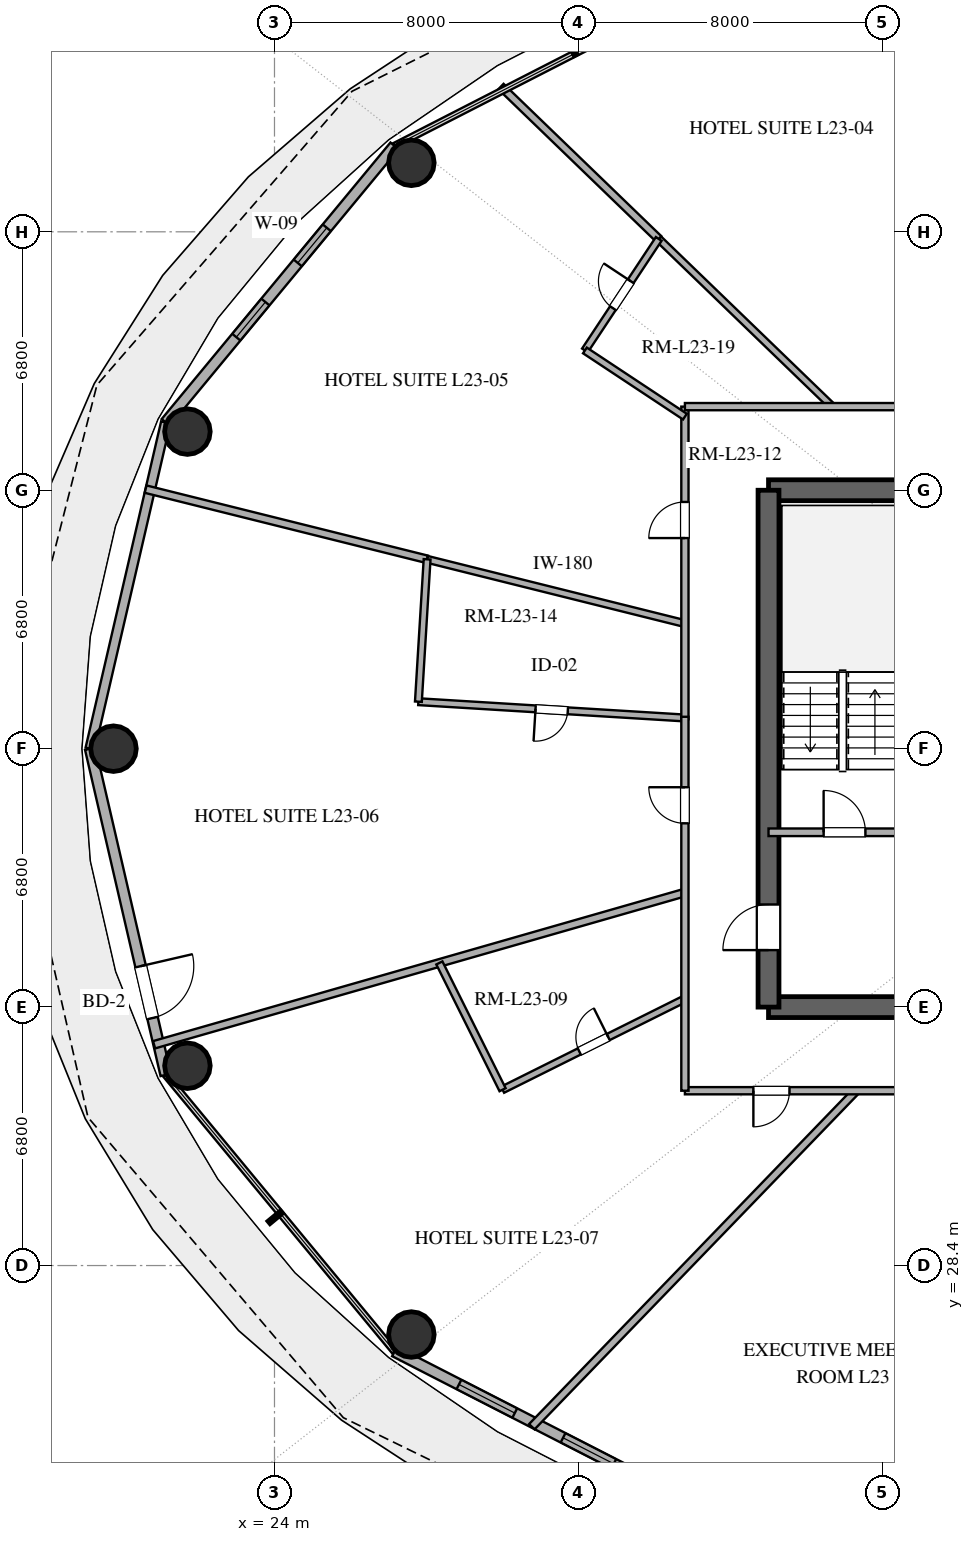
"""IFC4 building model, lengths in metres.
Left out: names, types, materials, properties, quantities, classifications, styles, units other than length and angle.
Written with IfcOpenShell. Run it as: python <this file> out.ifc"""

import sys

from ifc_helpers import new_model, si_unit, direction, frame, frame_2d, origin, origin_2d, place, context, subcontext, project, spatial, rectangle, hollow_circle, extrude, element, fill, save


model = new_model("IFC4")
c1 = context("Model", 3, precision=1e-05, world=origin(), true_north=direction((0.0, 1.0)))
c2 = subcontext(c1, "Body", "Model", "MODEL_VIEW")
j1 = project(units=[si_unit("LENGTHUNIT", "METRE"), si_unit("PLANEANGLEUNIT", "RADIAN")], contexts=[c1])
p1 = place(None, origin())
s1 = spatial("IfcSite", under=j1, at=p1, CompositionType="ELEMENT")
p2 = place(p1, origin())
s2 = spatial("IfcBuilding", under=s1, at=p2, CompositionType="ELEMENT")
p3 = place(p2, frame((0.0, 0.0, 94.8)))
s3 = spatial("IfcBuildingStorey", under=s2, at=p3, CompositionType="ELEMENT", Elevation=94.8)
for number, where, z_axis, x_axis in (
    (1, (37.0, 35.2, 0.0), (0.0, 0.0, 1.0), (1.0, 0.0, 0.0)),
    (2, (37.0, 48.8, 0.0), (0.0, 0.0, 1.0), (1.0, 0.0, 0.0)),
):
    element("IfcWall", number, at=place(p3, frame(where, z_axis=z_axis, x_axis=x_axis)), inside=s3, PredefinedType="SHEAR", context=c2, shape_type="SweptSolid", body=[
        extrude(rectangle(XDim=4.0, YDim=0.55, at=frame_2d((2.0, 0.0))), origin(), (0.0, 0.0, 1.0), 3.38),
    ])
p4 = place(p3, frame((37.0, 35.2, 0.0), z_axis=(0.0, 0.0, 1.0), x_axis=(0.0, 1.0, 0.0)))
e3 = element("IfcWall", 3, at=p4, inside=s3, PredefinedType="SHEAR", context=c2, shape_type="SweptSolid", body=[
    extrude(rectangle(XDim=13.6, YDim=0.55, at=frame_2d((6.8, 0.0))), origin(), (0.0, 0.0, 1.0), 3.38),
])
p5 = place(p4, frame((1.5, 0.0, 0.0)))
e4 = element("IfcOpeningElement", 4, at=p5, cuts=e3, PredefinedType="OPENING", context=c2, shape_type="SweptSolid", body=[
    extrude(rectangle(XDim=1.2, YDim=2.15, at=frame_2d((0.6, 1.075))), frame((0.0, 0.285, 0.0), z_axis=(0.0, -1.0, 0.0), x_axis=(1.0, 0.0, 0.0)), (0.0, 0.0, 1.0), 0.57),
])
for number, where, z_axis, x_axis in (
    (5, (27.602, 57.415, 0.0), (0.0, 0.0, 1.0), (1.0, 0.0, 0.0)),
    (6, (21.709, 50.343, 0.0), (0.0, 0.0, 1.0), (1.0, 0.0, 0.0)),
    (7, (19.763, 42.0, 0.0), (0.0, 0.0, 1.0), (1.0, 0.0, 0.0)),
    (8, (21.709, 33.657, 0.0), (0.0, 0.0, 1.0), (1.0, 0.0, 0.0)),
    (9, (27.602, 26.585, 0.0), (0.0, 0.0, 1.0), (1.0, 0.0, 0.0)),
):
    element("IfcColumn", number, at=place(p3, frame(where, z_axis=z_axis, x_axis=x_axis)), inside=s3, PredefinedType="COLUMN", context=c2, shape_type="SweptSolid", body=[
        extrude(hollow_circle(Radius=0.6, WallThickness=0.032, at=origin_2d()), origin(), (0.0, 0.0, 1.0), 3.38),
    ])
p6 = place(p3, frame((27.16, 57.86, 0.0), z_axis=(0.0, 0.0, 1.0), x_axis=(-0.637505817448, -0.770445541696, 0.0)))
e10 = element("IfcWall", 10, at=p6, inside=s3, PredefinedType="SOLIDWALL", context=c2, shape_type="SweptSolid", body=[
    extrude(rectangle(XDim=9.445, YDim=0.28, at=frame_2d((4.723, 0.0))), origin(), (0.0, 0.0, 1.0), 3.38),
])
p7 = place(p6, frame((2.797, 0.0, 0.85)))
e11 = element("IfcOpeningElement", 11, at=p7, cuts=e10, PredefinedType="OPENING", context=c2, shape_type="SweptSolid", body=[
    extrude(rectangle(XDim=1.2, YDim=1.8, at=frame_2d((0.6, 0.9))), frame((0.0, 0.15, 0.0), z_axis=(0.0, -1.0, 0.0), x_axis=(1.0, 0.0, 0.0)), (0.0, 0.0, 1.0), 0.3),
])
p8 = place(p6, frame((5.332, 0.0, 0.85)))
e12 = element("IfcOpeningElement", 12, at=p8, cuts=e10, PredefinedType="OPENING", context=c2, shape_type="SweptSolid", body=[
    extrude(rectangle(XDim=1.2, YDim=1.8, at=frame_2d((0.6, 0.9))), frame((0.0, 0.15, 0.0), z_axis=(0.0, -1.0, 0.0), x_axis=(1.0, 0.0, 0.0)), (0.0, 0.0, 1.0), 0.3),
])
p9 = place(p3, frame((21.139, 50.583, 0.0), z_axis=(0.0, 0.0, 1.0), x_axis=(-0.22558597182, -0.974223264616, 0.0)))
e13 = element("IfcWall", 13, at=p9, inside=s3, PredefinedType="SOLIDWALL", context=c2, shape_type="SweptSolid", body=[
    extrude(rectangle(XDim=8.811, YDim=0.25, at=frame_2d((4.405, 0.0))), origin(), (0.0, 0.0, 1.0), 3.38),
])
p10 = place(p3, frame((19.151, 42.0, 0.0), z_axis=(0.0, 0.0, 1.0), x_axis=(0.22558597182, -0.974223264616, 0.0)))
e14 = element("IfcWall", 14, at=p10, inside=s3, PredefinedType="SOLIDWALL", context=c2, shape_type="SweptSolid", body=[
    extrude(rectangle(XDim=8.811, YDim=0.28, at=frame_2d((4.405, 0.0))), origin(), (0.0, 0.0, 1.0), 3.38),
])
p11 = place(p10, frame((5.875, 0.0, 0.0)))
e15 = element("IfcOpeningElement", 15, at=p11, cuts=e14, PredefinedType="OPENING", context=c2, shape_type="SweptSolid", body=[
    extrude(rectangle(XDim=1.4, YDim=2.2, at=frame_2d((0.7, 1.1))), frame((0.0, 0.15, 0.0), z_axis=(0.0, -1.0, 0.0), x_axis=(1.0, 0.0, 0.0)), (0.0, 0.0, 1.0), 0.3),
])
p12 = place(p3, frame((27.16, 26.14, 0.0), z_axis=(0.0, 0.0, 1.0), x_axis=(0.889959505023, -0.45603955905, 0.0)))
e16 = element("IfcWall", 16, at=p12, inside=s3, PredefinedType="SOLIDWALL", context=c2, shape_type="SweptSolid", body=[
    extrude(rectangle(XDim=10.662, YDim=0.28, at=frame_2d((5.331, 0.0))), origin(), (0.0, 0.0, 1.0), 3.38),
])
p13 = place(p12, frame((1.904, 0.0, 0.85)))
e17 = element("IfcOpeningElement", 17, at=p13, cuts=e16, PredefinedType="OPENING", context=c2, shape_type="SweptSolid", body=[
    extrude(rectangle(XDim=1.65, YDim=2.0, at=frame_2d((0.825, 1.0))), frame((0.0, 0.15, 0.0), z_axis=(0.0, -1.0, 0.0), x_axis=(1.0, 0.0, 0.0)), (0.0, 0.0, 1.0), 0.3),
])
p14 = place(p12, frame((4.982, 0.0, 0.85)))
e18 = element("IfcOpeningElement", 18, at=p14, cuts=e16, PredefinedType="OPENING", context=c2, shape_type="SweptSolid", body=[
    extrude(rectangle(XDim=1.5, YDim=2.0, at=frame_2d((0.75, 1.0))), frame((0.0, 0.15, 0.0), z_axis=(0.0, -1.0, 0.0), x_axis=(1.0, 0.0, 0.0)), (0.0, 0.0, 1.0), 0.3),
])
p15 = place(p12, frame((7.096, 0.0, 0.85)))
e19 = element("IfcOpeningElement", 19, at=p15, cuts=e16, PredefinedType="OPENING", context=c2, shape_type="SweptSolid", body=[
    extrude(rectangle(XDim=1.5, YDim=2.0, at=frame_2d((0.75, 1.0))), frame((0.0, 0.15, 0.0), z_axis=(0.0, -1.0, 0.0), x_axis=(1.0, 0.0, 0.0)), (0.0, 0.0, 1.0), 0.3),
])
p16 = place(p3, frame((37.0, 39.8, 0.0), z_axis=(0.0, 0.0, 1.0), x_axis=(1.0, 0.0, 0.0)))
e20 = element("IfcWall", 20, at=p16, inside=s3, PredefinedType="SOLIDWALL", context=c2, shape_type="SweptSolid", body=[
    extrude(rectangle(XDim=4.0, YDim=0.2, at=frame_2d((2.0, 0.0))), origin(), (0.0, 0.0, 1.0), 2.74),
])
p17 = place(p16, frame((1.45, 0.0, 0.0)))
e21 = element("IfcOpeningElement", 21, at=p17, cuts=e20, PredefinedType="OPENING", context=c2, shape_type="SweptSolid", body=[
    extrude(rectangle(XDim=1.1, YDim=2.15, at=frame_2d((0.55, 1.075))), frame((0.0, 0.11, 0.0), z_axis=(0.0, -1.0, 0.0), x_axis=(1.0, 0.0, 0.0)), (0.0, 0.0, 1.0), 0.22),
])
p18 = place(p3, frame((30.772, 24.16, 0.0), z_axis=(0.0, 0.0, 1.0), x_axis=(0.694672506389, 0.719326149161, 0.0)))
e22 = element("IfcWall", 22, at=p18, inside=s3, PredefinedType="PARTITIONING", context=c2, shape_type="SweptSolid", body=[
    extrude(rectangle(XDim=12.289, YDim=0.2, at=frame_2d((6.145, 0.0))), origin(), (0.0, 0.0, 1.0), 2.74),
])
p19 = place(p3, frame((34.8, 38.215, 0.0), z_axis=(0.0, 0.0, 1.0), x_axis=(-0.961261030421, -0.275639676741, 0.0)))
e23 = element("IfcWall", 23, at=p19, inside=s3, PredefinedType="PARTITIONING", context=c2, shape_type="SweptSolid", body=[
    extrude(rectangle(XDim=14.531, YDim=0.2, at=frame_2d((7.266, 0.0))), origin(), (0.0, 0.0, 1.0), 2.74),
])
p20 = place(p3, frame((20.609, 48.829, 0.0), z_axis=(0.0, 0.0, 1.0), x_axis=(0.970302209845, -0.241895889938, 0.0)))
e24 = element("IfcWall", 24, at=p20, inside=s3, PredefinedType="PARTITIONING", context=c2, shape_type="SweptSolid", body=[
    extrude(rectangle(XDim=7.633, YDim=0.2, at=frame_2d((3.817, 0.0))), origin(), (0.0, 0.0, 1.0), 2.74),
])
p21 = place(p3, frame((34.8, 42.807, 0.0), z_axis=(0.0, 0.0, 1.0), x_axis=(-0.998134708281, 0.061050013314, 0.0)))
e25 = element("IfcWall", 25, at=p21, inside=s3, PredefinedType="PLUMBINGWALL", context=c2, shape_type="SweptSolid", body=[
    extrude(rectangle(XDim=7.026, YDim=0.18, at=frame_2d((3.513, 0.0))), origin(), (0.0, 0.0, 1.0), 2.74),
])
p22 = place(p21, frame((3.088, 0.0, 0.0)))
e26 = element("IfcOpeningElement", 26, at=p22, cuts=e25, PredefinedType="OPENING", context=c2, shape_type="SweptSolid", body=[
    extrude(rectangle(XDim=0.85, YDim=2.1, at=frame_2d((0.425, 1.05))), frame((0.0, 0.1, 0.0), z_axis=(0.0, -1.0, 0.0), x_axis=(1.0, 0.0, 0.0)), (0.0, 0.0, 1.0), 0.2),
])
p23 = place(p3, frame((28.016, 46.983, 0.0), z_axis=(0.0, 0.0, 1.0), x_axis=(0.970290206094, -0.241944034764, 0.0)))
e27 = element("IfcWall", 27, at=p23, inside=s3, PredefinedType="PLUMBINGWALL", context=c2, shape_type="SweptSolid", body=[
    extrude(rectangle(XDim=6.992, YDim=0.18, at=frame_2d((3.496, 0.0))), origin(), (0.0, 0.0, 1.0), 2.74),
])
p24 = place(p3, frame((47.482, 33.0, 0.0), z_axis=(0.0, 0.0, 1.0), x_axis=(-1.0, 0.0, 0.0)))
e28 = element("IfcWall", 28, at=p24, inside=s3, PredefinedType="PARTITIONING", context=c2, shape_type="SweptSolid", body=[
    extrude(rectangle(XDim=12.682, YDim=0.19, at=frame_2d((6.341, 0.0))), origin(), (0.0, 0.0, 1.0), 2.74),
])
p25 = place(p24, frame((4.455, 0.0, 0.0)))
e29 = element("IfcOpeningElement", 29, at=p25, cuts=e28, PredefinedType="OPENING", context=c2, shape_type="SweptSolid", body=[
    extrude(rectangle(XDim=1.0, YDim=2.2, at=frame_2d((0.5, 1.1))), frame((0.0, 0.105, 0.0), z_axis=(0.0, -1.0, 0.0), x_axis=(1.0, 0.0, 0.0)), (0.0, 0.0, 1.0), 0.21),
])
p26 = place(p24, frame((9.93, 0.0, 0.0)))
e30 = element("IfcOpeningElement", 30, at=p26, cuts=e28, PredefinedType="OPENING", context=c2, shape_type="SweptSolid", body=[
    extrude(rectangle(XDim=0.95, YDim=2.15, at=frame_2d((0.475, 1.075))), frame((0.0, 0.105, 0.0), z_axis=(0.0, -1.0, 0.0), x_axis=(1.0, 0.0, 0.0)), (0.0, 0.0, 1.0), 0.21),
])
p27 = place(p3, frame((34.111, 55.413, 0.0), z_axis=(0.0, 0.0, 1.0), x_axis=(0.719318009274, -0.694680935059, 0.0)))
e31 = element("IfcWall", 31, at=p27, inside=s3, PredefinedType="PLUMBINGWALL", context=c2, shape_type="SweptSolid", body=[
    extrude(rectangle(XDim=6.352, YDim=0.18, at=frame_2d((3.176, 0.0))), origin(), (0.0, 0.0, 1.0), 2.74),
])
p28 = place(p3, frame((29.959, 59.422, 0.0), z_axis=(0.0, 0.0, 1.0), x_axis=(0.719370121813, -0.694626970281, 0.0)))
e32 = element("IfcWall", 32, at=p28, inside=s3, PredefinedType="PARTITIONING", context=c2, shape_type="SweptSolid", body=[
    extrude(rectangle(XDim=5.772, YDim=0.2, at=frame_2d((2.886, 0.0))), origin(), (0.0, 0.0, 1.0), 2.74),
])
p29 = place(p3, frame((34.8, 42.775, 0.0), z_axis=(0.0, 0.0, 1.0), x_axis=(0.0, 1.0, 0.0)))
e33 = element("IfcWall", 33, at=p29, inside=s3, PredefinedType="PARTITIONING", context=c2, shape_type="SweptSolid", body=[
    extrude(rectangle(XDim=8.225, YDim=0.19, at=frame_2d((4.112, 0.0))), origin(), (0.0, 0.0, 1.0), 2.74),
])
p30 = place(p29, frame((4.767, 0.0, 0.0)))
e34 = element("IfcOpeningElement", 34, at=p30, cuts=e33, PredefinedType="OPENING", context=c2, shape_type="SweptSolid", body=[
    extrude(rectangle(XDim=0.95, YDim=2.15, at=frame_2d((0.475, 1.075))), frame((0.0, 0.105, 0.0), z_axis=(0.0, -1.0, 0.0), x_axis=(1.0, 0.0, 0.0)), (0.0, 0.0, 1.0), 0.21),
])
p31 = place(p3, frame((30.002, 33.027, 0.0), z_axis=(0.0, 0.0, 1.0), x_axis=(0.894936648514, 0.446193226244, 0.0)))
e35 = element("IfcWall", 35, at=p31, inside=s3, PredefinedType="PLUMBINGWALL", context=c2, shape_type="SweptSolid", body=[
    extrude(rectangle(XDim=5.361, YDim=0.18, at=frame_2d((2.681, 0.0))), origin(), (0.0, 0.0, 1.0), 2.74),
])
p32 = place(p31, frame((2.256, 0.0, 0.0)))
e36 = element("IfcOpeningElement", 36, at=p32, cuts=e35, PredefinedType="OPENING", context=c2, shape_type="SweptSolid", body=[
    extrude(rectangle(XDim=0.85, YDim=2.1, at=frame_2d((0.425, 1.05))), frame((0.0, 0.1, 0.0), z_axis=(0.0, -1.0, 0.0), x_axis=(1.0, 0.0, 0.0)), (0.0, 0.0, 1.0), 0.2),
])
p33 = place(p3, frame((34.8, 51.0, 0.0), z_axis=(0.0, 0.0, 1.0), x_axis=(1.0, 0.0, 0.0)))
e37 = element("IfcWall", 37, at=p33, inside=s3, PredefinedType="PARTITIONING", context=c2, shape_type="SweptSolid", body=[
    extrude(rectangle(XDim=10.653, YDim=0.19, at=frame_2d((5.326, 0.0))), origin(), (0.0, 0.0, 1.0), 2.74),
])
p34 = place(p33, frame((5.816, 0.0, 0.0)))
e38 = element("IfcOpeningElement", 38, at=p34, cuts=e37, PredefinedType="OPENING", context=c2, shape_type="SweptSolid", body=[
    extrude(rectangle(XDim=0.95, YDim=2.15, at=frame_2d((0.475, 1.075))), frame((0.0, 0.105, 0.0), z_axis=(0.0, -1.0, 0.0), x_axis=(1.0, 0.0, 0.0)), (0.0, 0.0, 1.0), 0.21),
])
p35 = place(p3, frame((34.8, 33.0, 0.0), z_axis=(0.0, 0.0, 1.0), x_axis=(0.0, 1.0, 0.0)))
e39 = element("IfcWall", 39, at=p35, inside=s3, PredefinedType="PARTITIONING", context=c2, shape_type="SweptSolid", body=[
    extrude(rectangle(XDim=9.839, YDim=0.19, at=frame_2d((4.92, 0.0))), origin(), (0.0, 0.0, 1.0), 2.74),
])
p36 = place(p35, frame((7.035, 0.0, 0.0)))
e40 = element("IfcOpeningElement", 40, at=p36, cuts=e39, PredefinedType="OPENING", context=c2, shape_type="SweptSolid", body=[
    extrude(rectangle(XDim=0.95, YDim=2.15, at=frame_2d((0.475, 1.075))), frame((0.0, 0.105, 0.0), z_axis=(0.0, -1.0, 0.0), x_axis=(1.0, 0.0, 0.0)), (0.0, 0.0, 1.0), 0.21),
])
p37 = place(p3, frame((27.787, 43.236, 0.0), z_axis=(0.0, 0.0, 1.0), x_axis=(0.061013519028, 0.998136939751, 0.0)))
e41 = element("IfcWall", 41, at=p37, inside=s3, PredefinedType="PLUMBINGWALL", context=c2, shape_type="SweptSolid", body=[
    extrude(rectangle(XDim=3.753, YDim=0.18, at=frame_2d((1.877, 0.0))), origin(), (0.0, 0.0, 1.0), 2.74),
])
p38 = place(p3, frame((28.339, 36.362, 0.0), z_axis=(0.0, 0.0, 1.0), x_axis=(0.446243949247, -0.894911357488, 0.0)))
e42 = element("IfcWall", 42, at=p38, inside=s3, PredefinedType="PLUMBINGWALL", context=c2, shape_type="SweptSolid", body=[
    extrude(rectangle(XDim=3.727, YDim=0.18, at=frame_2d((1.864, 0.0))), origin(), (0.0, 0.0, 1.0), 2.74),
])
p39 = place(p3, frame((32.169, 52.479, 0.0), z_axis=(0.0, 0.0, 1.0), x_axis=(0.551959146688, 0.833871153349, 0.0)))
e43 = element("IfcWall", 43, at=p39, inside=s3, PredefinedType="PLUMBINGWALL", context=c2, shape_type="SweptSolid", body=[
    extrude(rectangle(XDim=3.519, YDim=0.18, at=frame_2d((1.759, 0.0))), origin(), (0.0, 0.0, 1.0), 2.74),
])
p40 = place(p39, frame((1.334, 0.0, 0.0)))
e44 = element("IfcOpeningElement", 44, at=p40, cuts=e43, PredefinedType="OPENING", context=c2, shape_type="SweptSolid", body=[
    extrude(rectangle(XDim=0.85, YDim=2.1, at=frame_2d((0.425, 1.05))), frame((0.0, 0.1, 0.0), z_axis=(0.0, -1.0, 0.0), x_axis=(1.0, 0.0, 0.0)), (0.0, 0.0, 1.0), 0.2),
])
p41 = place(p3, frame((34.8, 50.737, 0.0), z_axis=(0.0, 0.0, 1.0), x_axis=(-0.833855219674, 0.5519832177, 0.0)))
e45 = element("IfcWall", 45, at=p41, inside=s3, PredefinedType="PLUMBINGWALL", context=c2, shape_type="SweptSolid", body=[
    extrude(rectangle(XDim=3.155, YDim=0.18, at=frame_2d((1.578, 0.0))), origin(), (0.0, 0.0, 1.0), 2.74),
])
p42 = place(p7, origin())
e46 = element("IfcWindow", 46, at=p42, inside=s3, PartitioningType="SINGLE_PANEL", PredefinedType="WINDOW", context=c2, shape_type="SweptSolid", body=[
    extrude(rectangle(XDim=1.2, YDim=1.8, at=frame_2d((0.6, 0.9))), frame((0.0, 0.03, 0.0), z_axis=(0.0, -1.0, 0.0), x_axis=(1.0, 0.0, 0.0)), (0.0, 0.0, 1.0), 0.06),
])
fill(e11, e46)
p43 = place(p8, origin())
e47 = element("IfcWindow", 47, at=p43, inside=s3, PartitioningType="SINGLE_PANEL", PredefinedType="WINDOW", context=c2, shape_type="SweptSolid", body=[
    extrude(rectangle(XDim=1.2, YDim=1.8, at=frame_2d((0.6, 0.9))), frame((0.0, 0.03, 0.0), z_axis=(0.0, -1.0, 0.0), x_axis=(1.0, 0.0, 0.0)), (0.0, 0.0, 1.0), 0.06),
])
fill(e12, e47)
p44 = place(p11, origin())
e48 = element("IfcDoor", 48, at=p44, inside=s3, OperationType="SINGLE_SWING_LEFT", PredefinedType="DOOR", context=c2, shape_type="SweptSolid", body=[
    extrude(rectangle(XDim=1.4, YDim=2.2, at=frame_2d((0.7, 1.1))), frame((0.0, 0.025, 0.0), z_axis=(0.0, -1.0, 0.0), x_axis=(1.0, 0.0, 0.0)), (0.0, 0.0, 1.0), 0.05),
])
fill(e15, e48)
p45 = place(p13, origin())
e49 = element("IfcWindow", 49, at=p45, inside=s3, PartitioningType="SINGLE_PANEL", PredefinedType="WINDOW", context=c2, shape_type="SweptSolid", body=[
    extrude(rectangle(XDim=1.65, YDim=2.0, at=frame_2d((0.825, 1.0))), frame((0.0, 0.03, 0.0), z_axis=(0.0, -1.0, 0.0), x_axis=(1.0, 0.0, 0.0)), (0.0, 0.0, 1.0), 0.06),
])
fill(e17, e49)
p46 = place(p14, origin())
e50 = element("IfcWindow", 50, at=p46, inside=s3, PartitioningType="SINGLE_PANEL", PredefinedType="WINDOW", context=c2, shape_type="SweptSolid", body=[
    extrude(rectangle(XDim=1.5, YDim=2.0, at=frame_2d((0.75, 1.0))), frame((0.0, 0.03, 0.0), z_axis=(0.0, -1.0, 0.0), x_axis=(1.0, 0.0, 0.0)), (0.0, 0.0, 1.0), 0.06),
])
fill(e18, e50)
p47 = place(p5, origin())
e51 = element("IfcDoor", 51, at=p47, inside=s3, OperationType="SINGLE_SWING_LEFT", PredefinedType="DOOR", context=c2, shape_type="SweptSolid", body=[
    extrude(rectangle(XDim=1.2, YDim=2.15, at=frame_2d((0.6, 1.075))), frame((0.0, 0.025, 0.0), z_axis=(0.0, -1.0, 0.0), x_axis=(1.0, 0.0, 0.0)), (0.0, 0.0, 1.0), 0.05),
])
fill(e4, e51)
p48 = place(p17, origin())
e52 = element("IfcDoor", 52, at=p48, inside=s3, OperationType="SINGLE_SWING_LEFT", PredefinedType="DOOR", context=c2, shape_type="SweptSolid", body=[
    extrude(rectangle(XDim=1.1, YDim=2.15, at=frame_2d((0.55, 1.075))), frame((0.0, 0.025, 0.0), z_axis=(0.0, -1.0, 0.0), x_axis=(1.0, 0.0, 0.0)), (0.0, 0.0, 1.0), 0.05),
])
fill(e21, e52)
p49 = place(p22, origin())
e53 = element("IfcDoor", 53, at=p49, inside=s3, OperationType="SINGLE_SWING_RIGHT", PredefinedType="DOOR", context=c2, shape_type="SweptSolid", body=[
    extrude(rectangle(XDim=0.85, YDim=2.1, at=frame_2d((0.425, 1.05))), frame((0.0, 0.025, 0.0), z_axis=(0.0, -1.0, 0.0), x_axis=(1.0, 0.0, 0.0)), (0.0, 0.0, 1.0), 0.05),
])
fill(e26, e53)
p50 = place(p26, origin())
e54 = element("IfcDoor", 54, at=p50, inside=s3, OperationType="SINGLE_SWING_RIGHT", PredefinedType="DOOR", context=c2, shape_type="SweptSolid", body=[
    extrude(rectangle(XDim=0.95, YDim=2.15, at=frame_2d((0.475, 1.075))), frame((0.0, 0.025, 0.0), z_axis=(0.0, -1.0, 0.0), x_axis=(1.0, 0.0, 0.0)), (0.0, 0.0, 1.0), 0.05),
])
fill(e30, e54)
p51 = place(p30, origin())
e55 = element("IfcDoor", 55, at=p51, inside=s3, OperationType="SINGLE_SWING_LEFT", PredefinedType="DOOR", context=c2, shape_type="SweptSolid", body=[
    extrude(rectangle(XDim=0.95, YDim=2.15, at=frame_2d((0.475, 1.075))), frame((0.0, 0.025, 0.0), z_axis=(0.0, -1.0, 0.0), x_axis=(1.0, 0.0, 0.0)), (0.0, 0.0, 1.0), 0.05),
])
fill(e34, e55)
p52 = place(p32, origin())
e56 = element("IfcDoor", 56, at=p52, inside=s3, OperationType="SINGLE_SWING_RIGHT", PredefinedType="DOOR", context=c2, shape_type="SweptSolid", body=[
    extrude(rectangle(XDim=0.85, YDim=2.1, at=frame_2d((0.425, 1.05))), frame((0.0, 0.025, 0.0), z_axis=(0.0, -1.0, 0.0), x_axis=(1.0, 0.0, 0.0)), (0.0, 0.0, 1.0), 0.05),
])
fill(e36, e56)
p53 = place(p36, origin())
e57 = element("IfcDoor", 57, at=p53, inside=s3, OperationType="SINGLE_SWING_RIGHT", PredefinedType="DOOR", context=c2, shape_type="SweptSolid", body=[
    extrude(rectangle(XDim=0.95, YDim=2.15, at=frame_2d((0.475, 1.075))), frame((0.0, 0.025, 0.0), z_axis=(0.0, -1.0, 0.0), x_axis=(1.0, 0.0, 0.0)), (0.0, 0.0, 1.0), 0.05),
])
fill(e40, e57)
p54 = place(p40, origin())
e58 = element("IfcDoor", 58, at=p54, inside=s3, OperationType="SINGLE_SWING_RIGHT", PredefinedType="DOOR", context=c2, shape_type="SweptSolid", body=[
    extrude(rectangle(XDim=0.85, YDim=2.1, at=frame_2d((0.425, 1.05))), frame((0.0, 0.025, 0.0), z_axis=(0.0, -1.0, 0.0), x_axis=(1.0, 0.0, 0.0)), (0.0, 0.0, 1.0), 0.05),
])
fill(e44, e58)
save(model, sys.argv[1])
